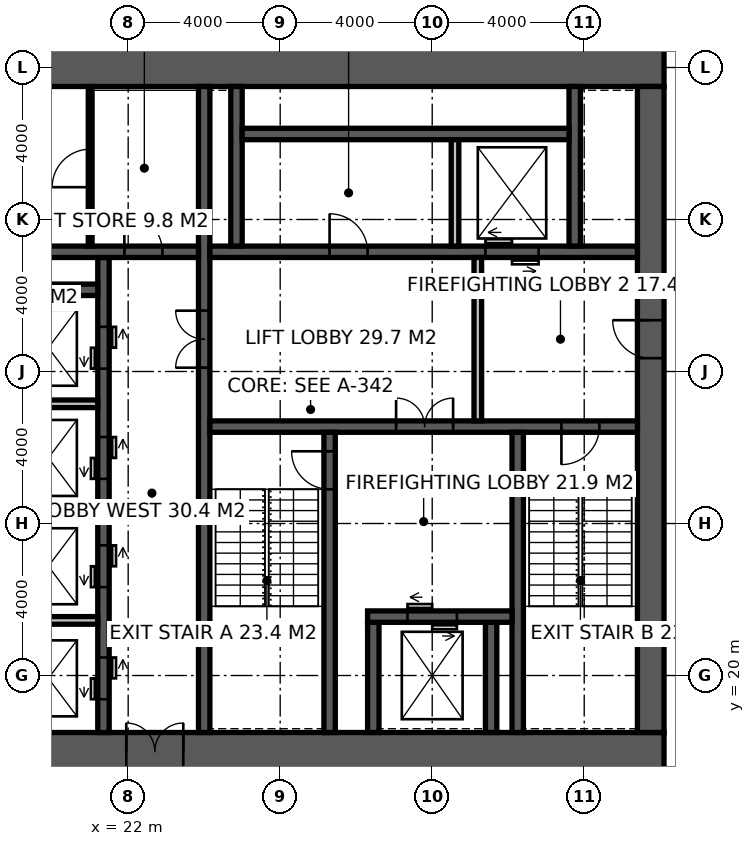
"""IFC4 building model, lengths in metres.
Left out: names, types, materials, properties, quantities, classifications, styles, units other than length and angle.
Written with IfcOpenShell. Run it as: python <this file> out.ifc"""

import sys

from ifc_helpers import new_model, si_unit, direction, frame, frame_2d, origin, place, context, subcontext, project, spatial, rectangle, extrude, element, fill, save


model = new_model("IFC4")
c1 = context("Model", 3, precision=1e-05, world=origin(), true_north=direction((0.0, 1.0)))
c2 = subcontext(c1, "Body", "Model", "MODEL_VIEW")
j1 = project(units=[si_unit("LENGTHUNIT", "METRE"), si_unit("PLANEANGLEUNIT", "RADIAN")], contexts=[c1])
p1 = place(None, origin())
s1 = spatial("IfcSite", under=j1, at=p1, CompositionType="ELEMENT")
p2 = place(p1, origin())
s2 = spatial("IfcBuilding", under=s1, at=p2, CompositionType="ELEMENT")
p3 = place(p2, frame((0.0, 0.0, 270.2)))
s3 = spatial("IfcBuildingStorey", under=s2, at=p3, CompositionType="ELEMENT", Elevation=270.2)
p4 = place(p3, frame((18.5, 18.0, -0.15), z_axis=(0.0, 0.0, 1.0), x_axis=(1.0, 0.0, 0.0)))
e1 = element("IfcWall", 1, at=p4, inside=s3, PredefinedType="SHEAR", context=c2, shape_type="SweptSolid", body=[
    extrude(rectangle(XDim=17.6, YDim=1.0, at=frame_2d((8.8, 0.0))), origin(), (0.0, 0.0, 1.0), 4.0),
])
p5 = place(p4, frame((3.45, 0.0, 0.15)))
e2 = element("IfcOpeningElement", 2, at=p5, cuts=e1, PredefinedType="OPENING", context=c2, shape_type="SweptSolid", body=[
    extrude(rectangle(XDim=1.5, YDim=2.4, at=frame_2d((0.75, 1.2))), frame((0.0, 0.51, 0.0), z_axis=(0.0, -1.0, 0.0), x_axis=(1.0, 0.0, 0.0)), (0.0, 0.0, 1.0), 1.02),
])
p6 = place(p3, frame((18.5, 36.0, -0.15), z_axis=(0.0, 0.0, 1.0), x_axis=(1.0, 0.0, 0.0)))
e3 = element("IfcWall", 3, at=p6, inside=s3, PredefinedType="SHEAR", context=c2, shape_type="SweptSolid", body=[
    extrude(rectangle(XDim=17.6, YDim=1.0, at=frame_2d((8.8, 0.0))), origin(), (0.0, 0.0, 1.0), 4.0),
])
p7 = place(p3, frame((35.75, 18.5, -0.15), z_axis=(0.0, 0.0, 1.0), x_axis=(0.0, 1.0, 0.0)))
e4 = element("IfcWall", 4, at=p7, inside=s3, PredefinedType="SHEAR", context=c2, shape_type="SweptSolid", body=[
    extrude(rectangle(XDim=17.0, YDim=0.7, at=frame_2d((8.5, 0.0))), origin(), (0.0, 0.0, 1.0), 4.0),
])
p8 = place(p7, frame((9.85, 0.0, 0.15)))
e5 = element("IfcOpeningElement", 5, at=p8, cuts=e4, PredefinedType="OPENING", context=c2, shape_type="SweptSolid", body=[
    extrude(rectangle(XDim=1.0, YDim=2.2, at=frame_2d((0.5, 1.1))), frame((0.0, 0.36, 0.0), z_axis=(0.0, -1.0, 0.0), x_axis=(1.0, 0.0, 0.0)), (0.0, 0.0, 1.0), 0.72),
])
p9 = place(p3, frame((24.0, 18.5, -0.15), z_axis=(0.0, 0.0, 1.0), x_axis=(0.0, 1.0, 0.0)))
e6 = element("IfcWall", 6, at=p9, inside=s3, PredefinedType="SHEAR", context=c2, shape_type="SweptSolid", body=[
    extrude(rectangle(XDim=17.0, YDim=0.3, at=frame_2d((8.5, 0.0))), origin(), (0.0, 0.0, 1.0), 4.0),
])
p10 = place(p9, frame((9.6, 0.0, 0.15)))
e7 = element("IfcOpeningElement", 7, at=p10, cuts=e6, PredefinedType="OPENING", context=c2, shape_type="SweptSolid", body=[
    extrude(rectangle(XDim=1.5, YDim=2.4, at=frame_2d((0.75, 1.2))), frame((0.0, 0.16, 0.0), z_axis=(0.0, -1.0, 0.0), x_axis=(1.0, 0.0, 0.0)), (0.0, 0.0, 1.0), 0.32),
])
p11 = place(p3, frame((24.15, 26.55, -0.15), z_axis=(0.0, 0.0, 1.0), x_axis=(1.0, 0.0, 0.0)))
e8 = element("IfcWall", 8, at=p11, inside=s3, PredefinedType="SHEAR", context=c2, shape_type="SweptSolid", body=[
    extrude(rectangle(XDim=11.25, YDim=0.3, at=frame_2d((5.625, 0.0))), origin(), (0.0, 0.0, 1.0), 4.0),
])
p12 = place(p11, frame((9.25, 0.0, 0.15)))
e9 = element("IfcOpeningElement", 9, at=p12, cuts=e8, PredefinedType="OPENING", context=c2, shape_type="SweptSolid", body=[
    extrude(rectangle(XDim=1.0, YDim=2.2, at=frame_2d((0.5, 1.1))), frame((0.0, 0.16, 0.0), z_axis=(0.0, -1.0, 0.0), x_axis=(1.0, 0.0, 0.0)), (0.0, 0.0, 1.0), 0.32),
])
p13 = place(p11, frame((4.9, 0.0, 0.15)))
e10 = element("IfcOpeningElement", 10, at=p13, cuts=e8, PredefinedType="OPENING", context=c2, shape_type="SweptSolid", body=[
    extrude(rectangle(XDim=1.5, YDim=2.4, at=frame_2d((0.75, 1.2))), frame((0.0, 0.16, 0.0), z_axis=(0.0, -1.0, 0.0), x_axis=(1.0, 0.0, 0.0)), (0.0, 0.0, 1.0), 0.32),
])
p14 = place(p3, frame((27.3, 18.5, -0.15), z_axis=(0.0, 0.0, 1.0), x_axis=(0.0, 1.0, 0.0)))
e11 = element("IfcWall", 11, at=p14, inside=s3, PredefinedType="SHEAR", context=c2, shape_type="SweptSolid", body=[
    extrude(rectangle(XDim=7.9, YDim=0.3, at=frame_2d((3.95, 0.0))), origin(), (0.0, 0.0, 1.0), 4.0),
])
p15 = place(p14, frame((6.4, 0.0, 0.15)))
e12 = element("IfcOpeningElement", 12, at=p15, cuts=e11, PredefinedType="OPENING", context=c2, shape_type="SweptSolid", body=[
    extrude(rectangle(XDim=1.0, YDim=2.2, at=frame_2d((0.5, 1.1))), frame((0.0, 0.16, 0.0), z_axis=(0.0, -1.0, 0.0), x_axis=(1.0, 0.0, 0.0)), (0.0, 0.0, 1.0), 0.32),
])
p16 = place(p3, frame((32.25, 18.5, -0.15), z_axis=(0.0, 0.0, 1.0), x_axis=(0.0, 1.0, 0.0)))
e13 = element("IfcWall", 13, at=p16, inside=s3, PredefinedType="SHEAR", context=c2, shape_type="SweptSolid", body=[
    extrude(rectangle(XDim=7.9, YDim=0.3, at=frame_2d((3.95, 0.0))), origin(), (0.0, 0.0, 1.0), 4.0),
])
for number, where, z_axis, x_axis in (
    (14, (28.45, 18.5, -0.15), (0.0, 0.0, 1.0), (0.0, 1.0, 0.0)),
    (15, (31.55, 18.5, -0.15), (0.0, 0.0, 1.0), (0.0, 1.0, 0.0)),
):
    element("IfcWall", number, at=place(p3, frame(where, z_axis=z_axis, x_axis=x_axis)), inside=s3, PredefinedType="SHEAR", context=c2, shape_type="SweptSolid", body=[
        extrude(rectangle(XDim=2.9, YDim=0.3, at=frame_2d((1.45, 0.0))), origin(), (0.0, 0.0, 1.0), 4.0),
    ])
p17 = place(p3, frame((28.3, 21.55, -0.15), z_axis=(0.0, 0.0, 1.0), x_axis=(1.0, 0.0, 0.0)))
e16 = element("IfcWall", 16, at=p17, inside=s3, PredefinedType="SHEAR", context=c2, shape_type="SweptSolid", body=[
    extrude(rectangle(XDim=3.8, YDim=0.3, at=frame_2d((1.9, 0.0))), origin(), (0.0, 0.0, 1.0), 4.0),
])
p18 = place(p17, frame((1.05, 0.0, 0.15)))
e17 = element("IfcOpeningElement", 17, at=p18, cuts=e16, PredefinedType="OPENING", context=c2, shape_type="SweptSolid", body=[
    extrude(rectangle(XDim=1.3, YDim=2.4, at=frame_2d((0.65, 1.2))), frame((0.0, 0.16, 0.0), z_axis=(0.0, -1.0, 0.0), x_axis=(1.0, 0.0, 0.0)), (0.0, 0.0, 1.0), 0.32),
])
p19 = place(p3, frame((24.15, 31.15, -0.15), z_axis=(0.0, 0.0, 1.0), x_axis=(1.0, 0.0, 0.0)))
e18 = element("IfcWall", 18, at=p19, inside=s3, PredefinedType="SHEAR", context=c2, shape_type="SweptSolid", body=[
    extrude(rectangle(XDim=11.25, YDim=0.3, at=frame_2d((5.625, 0.0))), origin(), (0.0, 0.0, 1.0), 4.0),
])
p20 = place(p19, frame((3.15, 0.0, 0.15)))
e19 = element("IfcOpeningElement", 19, at=p20, cuts=e18, PredefinedType="OPENING", context=c2, shape_type="SweptSolid", body=[
    extrude(rectangle(XDim=1.0, YDim=2.2, at=frame_2d((0.5, 1.1))), frame((0.0, 0.16, 0.0), z_axis=(0.0, -1.0, 0.0), x_axis=(1.0, 0.0, 0.0)), (0.0, 0.0, 1.0), 0.32),
])
p21 = place(p19, frame((7.25, 0.0, 0.15)))
e20 = element("IfcOpeningElement", 20, at=p21, cuts=e18, PredefinedType="OPENING", context=c2, shape_type="SweptSolid", body=[
    extrude(rectangle(XDim=1.4, YDim=2.4, at=frame_2d((0.7, 1.2))), frame((0.0, 0.16, 0.0), z_axis=(0.0, -1.0, 0.0), x_axis=(1.0, 0.0, 0.0)), (0.0, 0.0, 1.0), 0.32),
])
p22 = place(p3, frame((21.35, 18.5, -0.15), z_axis=(0.0, 0.0, 1.0), x_axis=(0.0, 1.0, 0.0)))
e21 = element("IfcWall", 21, at=p22, inside=s3, PredefinedType="SHEAR", context=c2, shape_type="SweptSolid", body=[
    extrude(rectangle(XDim=12.5, YDim=0.3, at=frame_2d((6.25, 0.0))), origin(), (0.0, 0.0, 1.0), 4.0),
])
p23 = place(p22, frame((0.875, 0.0, 0.15)))
e22 = element("IfcOpeningElement", 22, at=p23, cuts=e21, PredefinedType="OPENING", context=c2, shape_type="SweptSolid", body=[
    extrude(rectangle(XDim=1.1, YDim=2.2, at=frame_2d((0.55, 1.1))), frame((0.0, 0.16, 0.0), z_axis=(0.0, -1.0, 0.0), x_axis=(1.0, 0.0, 0.0)), (0.0, 0.0, 1.0), 0.32),
])
p24 = place(p22, frame((3.825, 0.0, 0.15)))
e23 = element("IfcOpeningElement", 23, at=p24, cuts=e21, PredefinedType="OPENING", context=c2, shape_type="SweptSolid", body=[
    extrude(rectangle(XDim=1.1, YDim=2.2, at=frame_2d((0.55, 1.1))), frame((0.0, 0.16, 0.0), z_axis=(0.0, -1.0, 0.0), x_axis=(1.0, 0.0, 0.0)), (0.0, 0.0, 1.0), 0.32),
])
p25 = place(p22, frame((6.675, 0.0, 0.15)))
e24 = element("IfcOpeningElement", 24, at=p25, cuts=e21, PredefinedType="OPENING", context=c2, shape_type="SweptSolid", body=[
    extrude(rectangle(XDim=1.1, YDim=2.2, at=frame_2d((0.55, 1.1))), frame((0.0, 0.16, 0.0), z_axis=(0.0, -1.0, 0.0), x_axis=(1.0, 0.0, 0.0)), (0.0, 0.0, 1.0), 0.32),
])
p26 = place(p22, frame((9.575, 0.0, 0.15)))
e25 = element("IfcOpeningElement", 25, at=p26, cuts=e21, PredefinedType="OPENING", context=c2, shape_type="SweptSolid", body=[
    extrude(rectangle(XDim=1.1, YDim=2.2, at=frame_2d((0.55, 1.1))), frame((0.0, 0.16, 0.0), z_axis=(0.0, -1.0, 0.0), x_axis=(1.0, 0.0, 0.0)), (0.0, 0.0, 1.0), 0.32),
])
p27 = place(p3, frame((18.5, 31.15, -0.15), z_axis=(0.0, 0.0, 1.0), x_axis=(1.0, 0.0, 0.0)))
e26 = element("IfcWall", 26, at=p27, inside=s3, PredefinedType="SHEAR", context=c2, shape_type="SweptSolid", body=[
    extrude(rectangle(XDim=5.35, YDim=0.3, at=frame_2d((2.675, 0.0))), origin(), (0.0, 0.0, 1.0), 4.0),
])
p28 = place(p27, frame((3.4, 0.0, 0.15)))
e27 = element("IfcOpeningElement", 27, at=p28, cuts=e26, PredefinedType="OPENING", context=c2, shape_type="SweptSolid", body=[
    extrude(rectangle(XDim=1.0, YDim=2.2, at=frame_2d((0.5, 1.1))), frame((0.0, 0.16, 0.0), z_axis=(0.0, -1.0, 0.0), x_axis=(1.0, 0.0, 0.0)), (0.0, 0.0, 1.0), 0.32),
])
p29 = place(p3, frame((18.5, 30.15, -0.15), z_axis=(0.0, 0.0, 1.0), x_axis=(1.0, 0.0, 0.0)))
e28 = element("IfcWall", 28, at=p29, inside=s3, PredefinedType="SHEAR", context=c2, shape_type="SweptSolid", body=[
    extrude(rectangle(XDim=2.7, YDim=0.3, at=frame_2d((1.35, 0.0))), origin(), (0.0, 0.0, 1.0), 4.0),
])
for number, where, z_axis, x_axis in (
    (29, (24.85, 31.3, -0.15), (0.0, 0.0, 1.0), (0.0, 1.0, 0.0)),
    (30, (33.75, 31.3, -0.15), (0.0, 0.0, 1.0), (0.0, 1.0, 0.0)),
):
    element("IfcWall", number, at=place(p3, frame(where, z_axis=z_axis, x_axis=x_axis)), inside=s3, PredefinedType="SHEAR", context=c2, shape_type="SweptSolid", body=[
        extrude(rectangle(XDim=4.2, YDim=0.3, at=frame_2d((2.1, 0.0))), origin(), (0.0, 0.0, 1.0), 4.0),
    ])
p30 = place(p3, frame((25.0, 34.25, -0.15), z_axis=(0.0, 0.0, 1.0), x_axis=(1.0, 0.0, 0.0)))
e31 = element("IfcWall", 31, at=p30, inside=s3, PredefinedType="SHEAR", context=c2, shape_type="SweptSolid", body=[
    extrude(rectangle(XDim=8.6, YDim=0.3, at=frame_2d((4.3, 0.0))), origin(), (0.0, 0.0, 1.0), 4.0),
])
p31 = place(p3, frame((30.6, 31.3, -0.15), z_axis=(0.0, 0.0, 1.0), x_axis=(0.0, 1.0, 0.0)))
e32 = element("IfcWall", 32, at=p31, inside=s3, PredefinedType="SOLIDWALL", context=c2, shape_type="SweptSolid", body=[
    extrude(rectangle(XDim=2.8, YDim=0.2, at=frame_2d((1.4, 0.0))), origin(), (0.0, 0.0, 1.0), 4.0),
])
for number, where, z_axis, x_axis in (
    (33, (18.5, 21.45, -0.15), (0.0, 0.0, 1.0), (1.0, 0.0, 0.0)),
    (34, (18.5, 24.3, -0.15), (0.0, 0.0, 1.0), (1.0, 0.0, 0.0)),
    (35, (18.5, 27.15, -0.15), (0.0, 0.0, 1.0), (1.0, 0.0, 0.0)),
):
    element("IfcWall", number, at=place(p3, frame(where, z_axis=z_axis, x_axis=x_axis)), inside=s3, PredefinedType="SOLIDWALL", context=c2, shape_type="SweptSolid", body=[
        extrude(rectangle(XDim=2.7, YDim=0.2, at=frame_2d((1.35, 0.0))), origin(), (0.0, 0.0, 1.0), 4.0),
    ])
p32 = place(p3, frame((31.2, 26.7, 0.0), z_axis=(0.0, 0.0, 1.0), x_axis=(0.0, 1.0, 0.0)))
e36 = element("IfcWall", 36, at=p32, inside=s3, PredefinedType="SOLIDWALL", context=c2, shape_type="SweptSolid", body=[
    extrude(rectangle(XDim=4.3, YDim=0.2, at=frame_2d((2.15, 0.0))), origin(), (0.0, 0.0, 1.0), 3.85),
])
p33 = place(p3, frame((21.0, 31.3, 0.0), z_axis=(0.0, 0.0, 1.0), x_axis=(0.0, 1.0, 0.0)))
e37 = element("IfcWall", 37, at=p33, inside=s3, PredefinedType="PARTITIONING", context=c2, shape_type="SweptSolid", body=[
    extrude(rectangle(XDim=4.2, YDim=0.1, at=frame_2d((2.1, 0.0))), origin(), (0.0, 0.0, 1.0), 3.85),
])
p34 = place(p33, frame((1.55, 0.0, 0.0)))
e38 = element("IfcOpeningElement", 38, at=p34, cuts=e37, PredefinedType="OPENING", context=c2, shape_type="SweptSolid", body=[
    extrude(rectangle(XDim=1.0, YDim=2.2, at=frame_2d((0.5, 1.1))), frame((0.0, 0.06, 0.0), z_axis=(0.0, -1.0, 0.0), x_axis=(1.0, 0.0, 0.0)), (0.0, 0.0, 1.0), 0.12),
])
p35 = place(p15, origin())
e39 = element("IfcDoor", 39, at=p35, inside=s3, OperationType="SINGLE_SWING_RIGHT", PredefinedType="DOOR", context=c2, shape_type="SweptSolid", body=[
    extrude(rectangle(XDim=1.0, YDim=2.2, at=frame_2d((0.5, 1.1))), frame((0.0, 0.025, 0.0), z_axis=(0.0, -1.0, 0.0), x_axis=(1.0, 0.0, 0.0)), (0.0, 0.0, 1.0), 0.05),
])
fill(e12, e39)
p36 = place(p12, frame((1.0, 0.0, 0.0), z_axis=(0.0, 0.0, 1.0), x_axis=(-1.0, 0.0, 0.0)))
e40 = element("IfcDoor", 40, at=p36, inside=s3, OperationType="SINGLE_SWING_RIGHT", PredefinedType="DOOR", context=c2, shape_type="SweptSolid", body=[
    extrude(rectangle(XDim=1.0, YDim=2.2, at=frame_2d((0.5, 1.1))), frame((0.0, 0.025, 0.0), z_axis=(0.0, -1.0, 0.0), x_axis=(1.0, 0.0, 0.0)), (0.0, 0.0, 1.0), 0.05),
])
fill(e9, e40)
p37 = place(p8, origin())
e41 = element("IfcDoor", 41, at=p37, inside=s3, OperationType="SINGLE_SWING_RIGHT", PredefinedType="DOOR", context=c2, shape_type="SweptSolid", body=[
    extrude(rectangle(XDim=1.0, YDim=2.2, at=frame_2d((0.5, 1.1))), frame((0.0, 0.025, 0.0), z_axis=(0.0, -1.0, 0.0), x_axis=(1.0, 0.0, 0.0)), (0.0, 0.0, 1.0), 0.05),
])
fill(e5, e41)
p38 = place(p13, origin())
e42 = element("IfcDoor", 42, at=p38, inside=s3, OperationType="DOUBLE_DOOR_DOUBLE_SWING", PredefinedType="DOOR", context=c2, shape_type="SweptSolid", body=[
    extrude(rectangle(XDim=1.5, YDim=2.4, at=frame_2d((0.75, 1.2))), frame((0.0, 0.025, 0.0), z_axis=(0.0, -1.0, 0.0), x_axis=(1.0, 0.0, 0.0)), (0.0, 0.0, 1.0), 0.05),
])
fill(e10, e42)
p39 = place(p10, origin())
e43 = element("IfcDoor", 43, at=p39, inside=s3, OperationType="DOUBLE_DOOR_DOUBLE_SWING", PredefinedType="DOOR", context=c2, shape_type="SweptSolid", body=[
    extrude(rectangle(XDim=1.5, YDim=2.4, at=frame_2d((0.75, 1.2))), frame((0.0, 0.025, 0.0), z_axis=(0.0, -1.0, 0.0), x_axis=(1.0, 0.0, 0.0)), (0.0, 0.0, 1.0), 0.05),
])
fill(e7, e43)
p40 = place(p28, origin())
e44 = element("IfcDoor", 44, at=p40, inside=s3, OperationType="SINGLE_SWING_LEFT", PredefinedType="DOOR", context=c2, shape_type="SweptSolid", body=[
    extrude(rectangle(XDim=1.0, YDim=2.2, at=frame_2d((0.5, 1.1))), frame((0.0, 0.025, 0.0), z_axis=(0.0, -1.0, 0.0), x_axis=(1.0, 0.0, 0.0)), (0.0, 0.0, 1.0), 0.05),
])
fill(e27, e44)
p41 = place(p34, origin())
e45 = element("IfcDoor", 45, at=p41, inside=s3, OperationType="SINGLE_SWING_LEFT", PredefinedType="DOOR", context=c2, shape_type="SweptSolid", body=[
    extrude(rectangle(XDim=1.0, YDim=2.2, at=frame_2d((0.5, 1.1))), frame((0.0, 0.025, 0.0), z_axis=(0.0, -1.0, 0.0), x_axis=(1.0, 0.0, 0.0)), (0.0, 0.0, 1.0), 0.05),
])
fill(e38, e45)
p42 = place(p20, origin())
e46 = element("IfcDoor", 46, at=p42, inside=s3, OperationType="SINGLE_SWING_LEFT", PredefinedType="DOOR", context=c2, shape_type="SweptSolid", body=[
    extrude(rectangle(XDim=1.0, YDim=2.2, at=frame_2d((0.5, 1.1))), frame((0.0, 0.025, 0.0), z_axis=(0.0, -1.0, 0.0), x_axis=(1.0, 0.0, 0.0)), (0.0, 0.0, 1.0), 0.05),
])
fill(e19, e46)
p43 = place(p5, origin())
e47 = element("IfcDoor", 47, at=p43, inside=s3, OperationType="DOUBLE_DOOR_DOUBLE_SWING", PredefinedType="DOOR", context=c2, shape_type="SweptSolid", body=[
    extrude(rectangle(XDim=1.5, YDim=2.4, at=frame_2d((0.75, 1.2))), frame((0.0, 0.025, 0.0), z_axis=(0.0, -1.0, 0.0), x_axis=(1.0, 0.0, 0.0)), (0.0, 0.0, 1.0), 0.05),
])
fill(e2, e47)
p44 = place(p18, origin())
e48 = element("IfcDoor", 48, at=p44, inside=s3, OperationType="DOUBLE_DOOR_SLIDING", PredefinedType="DOOR", context=c2, shape_type="SweptSolid", body=[
    extrude(rectangle(XDim=1.3, YDim=2.4, at=frame_2d((0.65, 1.2))), frame((0.0, 0.025, 0.0), z_axis=(0.0, -1.0, 0.0), x_axis=(1.0, 0.0, 0.0)), (0.0, 0.0, 1.0), 0.05),
])
fill(e17, e48)
p45 = place(p21, origin())
e49 = element("IfcDoor", 49, at=p45, inside=s3, OperationType="DOUBLE_DOOR_SLIDING", PredefinedType="DOOR", context=c2, shape_type="SweptSolid", body=[
    extrude(rectangle(XDim=1.4, YDim=2.4, at=frame_2d((0.7, 1.2))), frame((0.0, 0.025, 0.0), z_axis=(0.0, -1.0, 0.0), x_axis=(1.0, 0.0, 0.0)), (0.0, 0.0, 1.0), 0.05),
])
fill(e20, e49)
p46 = place(p23, origin())
e50 = element("IfcDoor", 50, at=p46, inside=s3, OperationType="DOUBLE_DOOR_SLIDING", PredefinedType="DOOR", context=c2, shape_type="SweptSolid", body=[
    extrude(rectangle(XDim=1.1, YDim=2.2, at=frame_2d((0.55, 1.1))), frame((0.0, 0.025, 0.0), z_axis=(0.0, -1.0, 0.0), x_axis=(1.0, 0.0, 0.0)), (0.0, 0.0, 1.0), 0.05),
])
fill(e22, e50)
p47 = place(p24, origin())
e51 = element("IfcDoor", 51, at=p47, inside=s3, OperationType="DOUBLE_DOOR_SLIDING", PredefinedType="DOOR", context=c2, shape_type="SweptSolid", body=[
    extrude(rectangle(XDim=1.1, YDim=2.2, at=frame_2d((0.55, 1.1))), frame((0.0, 0.025, 0.0), z_axis=(0.0, -1.0, 0.0), x_axis=(1.0, 0.0, 0.0)), (0.0, 0.0, 1.0), 0.05),
])
fill(e23, e51)
p48 = place(p25, origin())
e52 = element("IfcDoor", 52, at=p48, inside=s3, OperationType="DOUBLE_DOOR_SLIDING", PredefinedType="DOOR", context=c2, shape_type="SweptSolid", body=[
    extrude(rectangle(XDim=1.1, YDim=2.2, at=frame_2d((0.55, 1.1))), frame((0.0, 0.025, 0.0), z_axis=(0.0, -1.0, 0.0), x_axis=(1.0, 0.0, 0.0)), (0.0, 0.0, 1.0), 0.05),
])
fill(e24, e52)
p49 = place(p26, origin())
e53 = element("IfcDoor", 53, at=p49, inside=s3, OperationType="DOUBLE_DOOR_SLIDING", PredefinedType="DOOR", context=c2, shape_type="SweptSolid", body=[
    extrude(rectangle(XDim=1.1, YDim=2.2, at=frame_2d((0.55, 1.1))), frame((0.0, 0.025, 0.0), z_axis=(0.0, -1.0, 0.0), x_axis=(1.0, 0.0, 0.0)), (0.0, 0.0, 1.0), 0.05),
])
fill(e25, e53)
save(model, sys.argv[1])
